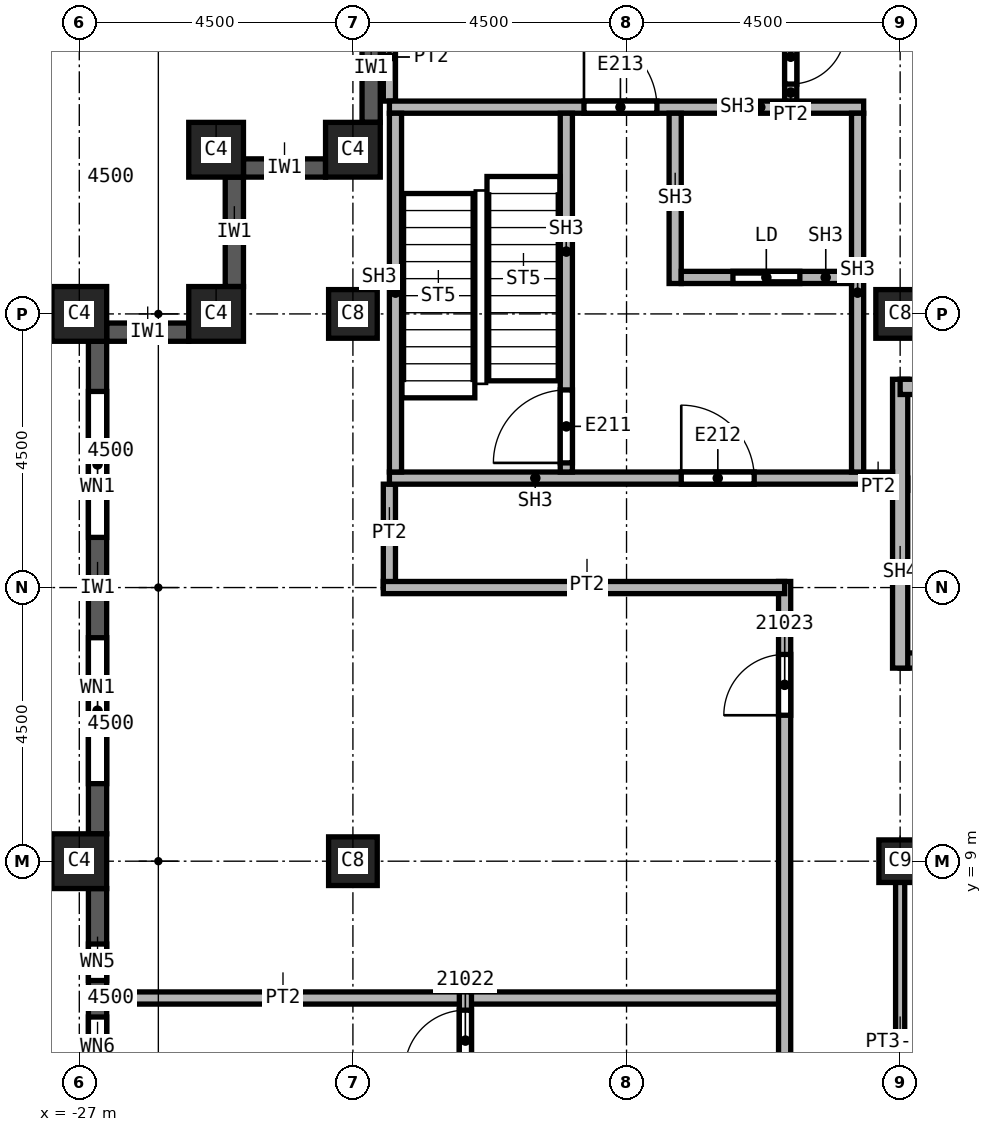
"""IFC4 building model, lengths in metres.
Left out: names, types, materials, properties, quantities, classifications, styles, units other than length and angle.
Written with IfcOpenShell. Run it as: python <this file> out.ifc"""

import sys

from ifc_helpers import new_model, si_unit, direction, frame, frame_2d, origin, origin_2d, place, context, subcontext, project, spatial, rectangle, extrude, element, fill, save


model = new_model("IFC4")
c1 = context("Model", 3, precision=1e-05, world=origin(), true_north=direction((0.0, 1.0)))
c2 = subcontext(c1, "Body", "Model", "MODEL_VIEW")
j1 = project(units=[si_unit("LENGTHUNIT", "METRE"), si_unit("PLANEANGLEUNIT", "RADIAN")], contexts=[c1])
p1 = place(None, origin())
s1 = spatial("IfcSite", under=j1, at=p1, CompositionType="ELEMENT")
p2 = place(p1, origin())
s2 = spatial("IfcBuilding", under=s1, at=p2, CompositionType="ELEMENT")
p3 = place(p2, frame((0.0, 0.0, 304.0)))
s3 = spatial("IfcBuildingStorey", under=s2, at=p3, CompositionType="ELEMENT", Elevation=304.0)
for number, where, z_axis, x_axis in (
    (1, (-13.5, 18.0, 0.0), (0.0, 0.0, 1.0), (1.0, 0.0, 0.0)),
    (2, (-22.5, 9.0, 0.0), (0.0, 0.0, 1.0), (1.0, 0.0, 0.0)),
    (3, (-22.5, 18.0, 0.0), (0.0, 0.0, 1.0), (1.0, 0.0, 0.0)),
):
    element("IfcColumn", number, at=place(p3, frame(where, z_axis=z_axis, x_axis=x_axis)), inside=s3, PredefinedType="COLUMN", context=c2, shape_type="SweptSolid", body=[
        extrude(rectangle(XDim=0.8, YDim=0.8, at=origin_2d()), origin(), (0.0, 0.0, 1.0), 3.74),
    ])
p4 = place(p3, frame((-13.5, 9.0, 0.0), z_axis=(0.0, 0.0, 1.0), x_axis=(1.0, 0.0, 0.0)))
e4 = element("IfcColumn", 4, at=p4, inside=s3, PredefinedType="COLUMN", context=c2, shape_type="SweptSolid", body=[
    extrude(rectangle(XDim=0.7, YDim=0.7, at=origin_2d()), origin(), (0.0, 0.0, 1.0), 3.74),
])
for number, where, z_axis, x_axis in (
    (5, (-27.0, 9.0, 0.0), (0.0, 0.0, 1.0), (0.0, 1.0, 0.0)),
    (6, (-27.0, 18.0, 0.0), (0.0, 0.0, 1.0), (0.0, 1.0, 0.0)),
    (7, (-22.5, 20.7, 0.0), (0.0, 0.0, 1.0), (1.0, 0.0, 0.0)),
    (8, (-24.75, 20.7, 0.0), (0.0, 0.0, 1.0), (1.0, 0.0, 0.0)),
    (9, (-24.75, 18.0, 0.0), (0.0, 0.0, 1.0), (1.0, 0.0, 0.0)),
):
    element("IfcColumn", number, at=place(p3, frame(where, z_axis=z_axis, x_axis=x_axis)), inside=s3, PredefinedType="COLUMN", context=c2, shape_type="SweptSolid", body=[
        extrude(rectangle(XDim=0.9, YDim=0.9, at=origin_2d()), origin(), (0.0, 0.0, 1.0), 3.74),
    ])
p5 = place(p3, frame((-24.45, 20.25, 0.0), z_axis=(0.0, 0.0, 1.0), x_axis=(0.0, -1.0, 0.0)))
e10 = element("IfcWall", 10, at=p5, inside=s3, PredefinedType="SOLIDWALL", context=c2, shape_type="SweptSolid", body=[
    extrude(rectangle(XDim=1.8, YDim=0.3, at=frame_2d((0.9, 0.0))), origin(), (0.0, 0.0, 1.0), 3.14),
])
p6 = place(p3, frame((-25.2, 17.7, 0.0), z_axis=(0.0, 0.0, 1.0), x_axis=(-1.0, 0.0, 0.0)))
e11 = element("IfcWall", 11, at=p6, inside=s3, PredefinedType="SOLIDWALL", context=c2, shape_type="SweptSolid", body=[
    extrude(rectangle(XDim=1.35, YDim=0.3, at=frame_2d((0.675, 0.0))), origin(), (0.0, 0.0, 1.0), 3.14),
])
p7 = place(p3, frame((-26.7, 17.55, 0.0), z_axis=(0.0, 0.0, 1.0), x_axis=(0.0, -1.0, 0.0)))
e12 = element("IfcWall", 12, at=p7, inside=s3, PredefinedType="SOLIDWALL", context=c2, shape_type="SweptSolid", body=[
    extrude(rectangle(XDim=8.1, YDim=0.3, at=frame_2d((4.05, 0.0))), origin(), (0.0, 0.0, 1.0), 3.14),
])
p8 = place(p7, frame((0.825, 0.0, 0.8)))
e13 = element("IfcOpeningElement", 13, at=p8, cuts=e12, PredefinedType="OPENING", context=c2, shape_type="SweptSolid", body=[
    extrude(rectangle(XDim=2.4, YDim=1.95, at=frame_2d((1.2, 0.975))), frame((0.0, 0.15, 0.0), z_axis=(0.0, -1.0, 0.0), x_axis=(1.0, 0.0, 0.0)), (0.0, 0.0, 1.0), 0.3),
])
p9 = place(p7, frame((4.875, 0.0, 0.8)))
e14 = element("IfcOpeningElement", 14, at=p9, cuts=e12, PredefinedType="OPENING", context=c2, shape_type="SweptSolid", body=[
    extrude(rectangle(XDim=2.4, YDim=1.95, at=frame_2d((1.2, 0.975))), frame((0.0, 0.15, 0.0), z_axis=(0.0, -1.0, 0.0), x_axis=(1.0, 0.0, 0.0)), (0.0, 0.0, 1.0), 0.3),
])
p10 = place(p3, frame((-26.7, 8.55, 0.0), z_axis=(0.0, 0.0, 1.0), x_axis=(0.0, -1.0, 0.0)))
e15 = element("IfcWall", 15, at=p10, inside=s3, PredefinedType="SOLIDWALL", context=c2, shape_type="SweptSolid", body=[
    extrude(rectangle(XDim=8.1, YDim=0.3, at=frame_2d((4.05, 0.0))), origin(), (0.0, 0.0, 1.0), 3.14),
])
p11 = place(p10, frame((4.875, 0.0, 0.8)))
e16 = element("IfcOpeningElement", 16, at=p11, cuts=e15, PredefinedType="OPENING", context=c2, shape_type="SweptSolid", body=[
    extrude(rectangle(XDim=2.4, YDim=1.95, at=frame_2d((1.2, 0.975))), frame((0.0, 0.15, 0.0), z_axis=(0.0, -1.0, 0.0), x_axis=(1.0, 0.0, 0.0)), (0.0, 0.0, 1.0), 0.3),
])
p12 = place(p10, frame((0.913, 0.0, 0.8)))
e17 = element("IfcOpeningElement", 17, at=p12, cuts=e15, PredefinedType="OPENING", context=c2, shape_type="SweptSolid", body=[
    extrude(rectangle(XDim=0.6, YDim=1.95, at=frame_2d((0.3, 0.975))), frame((0.0, 0.15, 0.0), z_axis=(0.0, -1.0, 0.0), x_axis=(1.0, 0.0, 0.0)), (0.0, 0.0, 1.0), 0.3),
])
p13 = place(p10, frame((2.113, 0.0, 0.8)))
e18 = element("IfcOpeningElement", 18, at=p13, cuts=e15, PredefinedType="OPENING", context=c2, shape_type="SweptSolid", body=[
    extrude(rectangle(XDim=1.0, YDim=1.95, at=frame_2d((0.5, 0.975))), frame((0.0, 0.15, 0.0), z_axis=(0.0, -1.0, 0.0), x_axis=(1.0, 0.0, 0.0)), (0.0, 0.0, 1.0), 0.3),
])
p14 = place(p3, frame((-22.2, 22.95, 0.0), z_axis=(0.0, 0.0, 1.0), x_axis=(0.0, -1.0, 0.0)))
e19 = element("IfcWall", 19, at=p14, inside=s3, PredefinedType="SOLIDWALL", context=c2, shape_type="SweptSolid", body=[
    extrude(rectangle(XDim=1.8, YDim=0.3, at=frame_2d((0.9, 0.0))), origin(), (0.0, 0.0, 1.0), 3.14),
])
p15 = place(p3, frame((-22.95, 20.4, 0.0), z_axis=(0.0, 0.0, 1.0), x_axis=(-1.0, 0.0, 0.0)))
e20 = element("IfcWall", 20, at=p15, inside=s3, PredefinedType="SOLIDWALL", context=c2, shape_type="SweptSolid", body=[
    extrude(rectangle(XDim=1.35, YDim=0.3, at=frame_2d((0.675, 0.0))), origin(), (0.0, 0.0, 1.0), 3.14),
])
p16 = place(p3, frame((-26.55, 6.75, 0.0), z_axis=(0.0, 0.0, 1.0), x_axis=(1.0, 0.0, 0.0)))
e21 = element("IfcWall", 21, at=p16, inside=s3, PredefinedType="PARTITIONING", context=c2, shape_type="SweptSolid", body=[
    extrude(rectangle(XDim=11.15, YDim=0.2, at=frame_2d((5.575, 0.0))), origin(), (0.0, 0.0, 1.0), 3.74),
])
p17 = place(p3, frame((-21.9, 13.5, 0.0), z_axis=(0.0, 0.0, 1.0), x_axis=(0.0, 1.0, 0.0)))
e22 = element("IfcWall", 22, at=p17, inside=s3, PredefinedType="PARTITIONING", context=c2, shape_type="SweptSolid", body=[
    extrude(rectangle(XDim=1.7, YDim=0.2, at=frame_2d((0.85, 0.0))), origin(), (0.0, 0.0, 1.0), 3.74),
])
p18 = place(p3, frame((-21.9, 21.5, 0.0), z_axis=(0.0, 0.0, 1.0), x_axis=(0.0, 1.0, 0.0)))
e23 = element("IfcWall", 23, at=p18, inside=s3, PredefinedType="PARTITIONING", context=c2, shape_type="SweptSolid", body=[
    extrude(rectangle(XDim=1.45, YDim=0.2, at=frame_2d((0.725, 0.0))), origin(), (0.0, 0.0, 1.0), 3.74),
])
p19 = place(p3, frame((-20.65, -11.25, 0.0), z_axis=(0.0, 0.0, 1.0), x_axis=(0.0, 1.0, 0.0)))
e24 = element("IfcWall", 24, at=p19, inside=s3, PredefinedType="PARTITIONING", context=c2, shape_type="SweptSolid", body=[
    extrude(rectangle(XDim=18.1, YDim=0.2, at=frame_2d((9.05, 0.0))), origin(), (0.0, 0.0, 1.0), 3.74),
])
p20 = place(p19, frame((16.8, 0.0, 0.0)))
e25 = element("IfcOpeningElement", 25, at=p20, cuts=e24, PredefinedType="OPENING", context=c2, shape_type="SweptSolid", body=[
    extrude(rectangle(XDim=1.0, YDim=2.1, at=frame_2d((0.5, 1.05))), frame((0.0, 0.1, 0.0), z_axis=(0.0, -1.0, 0.0), x_axis=(1.0, 0.0, 0.0)), (0.0, 0.0, 1.0), 0.2),
])
p21 = place(p19, frame((3.1, 0.0, 0.0)))
e26 = element("IfcOpeningElement", 26, at=p21, cuts=e24, PredefinedType="OPENING", context=c2, shape_type="SweptSolid", body=[
    extrude(rectangle(XDim=1.0, YDim=2.1, at=frame_2d((0.5, 1.05))), frame((0.0, 0.1, 0.0), z_axis=(0.0, -1.0, 0.0), x_axis=(1.0, 0.0, 0.0)), (0.0, 0.0, 1.0), 0.2),
])
p22 = place(p3, frame((-15.4, -22.95, 0.0), z_axis=(0.0, 0.0, 1.0), x_axis=(0.0, 1.0, 0.0)))
e27 = element("IfcWall", 27, at=p22, inside=s3, PredefinedType="PARTITIONING", context=c2, shape_type="SweptSolid", body=[
    extrude(rectangle(XDim=36.55, YDim=0.2, at=frame_2d((18.275, 0.0))), origin(), (0.0, 0.0, 1.0), 3.74),
])
p23 = place(p22, frame((23.1, 0.0, 0.0)))
e28 = element("IfcOpeningElement", 28, at=p23, cuts=e27, PredefinedType="OPENING", context=c2, shape_type="SweptSolid", body=[
    extrude(rectangle(XDim=1.0, YDim=2.1, at=frame_2d((0.5, 1.05))), frame((0.0, 0.1, 0.0), z_axis=(0.0, -1.0, 0.0), x_axis=(1.0, 0.0, 0.0)), (0.0, 0.0, 1.0), 0.2),
])
p24 = place(p22, frame((34.35, 0.0, 0.0)))
e29 = element("IfcOpeningElement", 29, at=p24, cuts=e27, PredefinedType="OPENING", context=c2, shape_type="SweptSolid", body=[
    extrude(rectangle(XDim=1.0, YDim=2.1, at=frame_2d((0.5, 1.05))), frame((0.0, 0.1, 0.0), z_axis=(0.0, -1.0, 0.0), x_axis=(1.0, 0.0, 0.0)), (0.0, 0.0, 1.0), 0.2),
])
p25 = place(p22, frame((2.95, 0.0, 0.0)))
e30 = element("IfcOpeningElement", 30, at=p25, cuts=e27, PredefinedType="OPENING", context=c2, shape_type="SweptSolid", body=[
    extrude(rectangle(XDim=1.0, YDim=2.1, at=frame_2d((0.5, 1.05))), frame((0.0, 0.1, 0.0), z_axis=(0.0, -1.0, 0.0), x_axis=(1.0, 0.0, 0.0)), (0.0, 0.0, 1.0), 0.2),
])
p26 = place(p22, frame((6.15, 0.0, 0.0)))
e31 = element("IfcOpeningElement", 31, at=p26, cuts=e27, PredefinedType="OPENING", context=c2, shape_type="SweptSolid", body=[
    extrude(rectangle(XDim=1.0, YDim=2.1, at=frame_2d((0.5, 1.05))), frame((0.0, 0.1, 0.0), z_axis=(0.0, -1.0, 0.0), x_axis=(1.0, 0.0, 0.0)), (0.0, 0.0, 1.0), 0.2),
])
p27 = place(p22, frame((8.625, 0.0, 0.0)))
e32 = element("IfcOpeningElement", 32, at=p27, cuts=e27, PredefinedType="OPENING", context=c2, shape_type="SweptSolid", body=[
    extrude(rectangle(XDim=1.0, YDim=2.1, at=frame_2d((0.5, 1.05))), frame((0.0, 0.1, 0.0), z_axis=(0.0, -1.0, 0.0), x_axis=(1.0, 0.0, 0.0)), (0.0, 0.0, 1.0), 0.2),
])
p28 = place(p22, frame((15.0, 0.0, 0.0)))
e33 = element("IfcOpeningElement", 33, at=p28, cuts=e27, PredefinedType="OPENING", context=c2, shape_type="SweptSolid", body=[
    extrude(rectangle(XDim=1.0, YDim=2.1, at=frame_2d((0.5, 1.05))), frame((0.0, 0.1, 0.0), z_axis=(0.0, -1.0, 0.0), x_axis=(1.0, 0.0, 0.0)), (0.0, 0.0, 1.0), 0.2),
])
p29 = place(p3, frame((-15.4, 13.5, 0.0), z_axis=(0.0, 0.0, 1.0), x_axis=(-1.0, 0.0, 0.0)))
e34 = element("IfcWall", 34, at=p29, inside=s3, PredefinedType="PARTITIONING", context=c2, shape_type="SweptSolid", body=[
    extrude(rectangle(XDim=6.6, YDim=0.2, at=frame_2d((3.3, 0.0))), origin(), (0.0, 0.0, 1.0), 3.74),
])
p30 = place(p3, frame((-15.3, 22.95, 0.0), z_axis=(0.0, 0.0, 1.0), x_axis=(0.0, -1.0, 0.0)))
e35 = element("IfcWall", 35, at=p30, inside=s3, PredefinedType="PARTITIONING", context=c2, shape_type="SweptSolid", body=[
    extrude(rectangle(XDim=1.45, YDim=0.2, at=frame_2d((0.725, 0.0))), origin(), (0.0, 0.0, 1.0), 3.74),
])
p31 = place(p30, frame((0.27, 0.0, 0.0)))
e36 = element("IfcOpeningElement", 36, at=p31, cuts=e35, PredefinedType="OPENING", context=c2, shape_type="SweptSolid", body=[
    extrude(rectangle(XDim=0.9, YDim=2.1, at=frame_2d((0.45, 1.05))), frame((0.0, 0.1, 0.0), z_axis=(0.0, -1.0, 0.0), x_axis=(1.0, 0.0, 0.0)), (0.0, 0.0, 1.0), 0.2),
])
p32 = place(p3, frame((-14.1, 15.2, 0.0), z_axis=(0.0, 0.0, 1.0), x_axis=(1.0, 0.0, 0.0)))
e37 = element("IfcWall", 37, at=p32, inside=s3, PredefinedType="PARTITIONING", context=c2, shape_type="SweptSolid", body=[
    extrude(rectangle(XDim=0.725, YDim=0.2, at=frame_2d((0.363, 0.0))), origin(), (0.0, 0.0, 1.0), 3.74),
])
p33 = place(p3, frame((-13.5, 12.3, 0.0), z_axis=(0.0, 0.0, 1.0), x_axis=(1.0, 0.0, 0.0)))
e38 = element("IfcWall", 38, at=p33, inside=s3, PredefinedType="SOLIDWALL", context=c2, shape_type="SweptSolid", body=[
    extrude(rectangle(XDim=9.125, YDim=0.25, at=frame_2d((4.562, 0.0))), origin(), (0.0, 0.0, 1.0), 3.74),
])
p34 = place(p33, frame((0.6, 0.0, 0.0)))
e39 = element("IfcOpeningElement", 39, at=p34, cuts=e38, PredefinedType="OPENING", context=c2, shape_type="SweptSolid", body=[
    extrude(rectangle(XDim=1.2, YDim=2.1, at=frame_2d((0.6, 1.05))), frame((0.0, 0.125, 0.0), z_axis=(0.0, -1.0, 0.0), x_axis=(1.0, 0.0, 0.0)), (0.0, 0.0, 1.0), 0.25),
])
p35 = place(p3, frame((-13.5, 12.175, 0.0), z_axis=(0.0, 0.0, 1.0), x_axis=(0.0, 1.0, 0.0)))
e40 = element("IfcWall", 40, at=p35, inside=s3, PredefinedType="SOLIDWALL", context=c2, shape_type="SweptSolid", body=[
    extrude(rectangle(XDim=4.75, YDim=0.25, at=frame_2d((2.375, 0.0))), origin(), (0.0, 0.0, 1.0), 3.74),
])
p36 = place(p3, frame((-13.5, 16.8, 0.0), z_axis=(0.0, 0.0, 1.0), x_axis=(1.0, 0.0, 0.0)))
e41 = element("IfcWall", 41, at=p36, inside=s3, PredefinedType="SOLIDWALL", context=c2, shape_type="SweptSolid", body=[
    extrude(rectangle(XDim=9.125, YDim=0.25, at=frame_2d((4.562, 0.0))), origin(), (0.0, 0.0, 1.0), 3.74),
])
p37 = place(p3, frame((-13.5, 3.0, 0.0), z_axis=(0.0, 0.0, 1.0), x_axis=(0.0, 1.0, 0.0)))
e42 = element("IfcWall", 42, at=p37, inside=s3, PredefinedType="PARTITIONING", context=c2, shape_type="SweptSolid", body=[
    extrude(rectangle(XDim=6.075, YDim=0.15, at=frame_2d((3.038, 0.0))), origin(), (0.0, 0.0, 1.0), 3.062),
])
p38 = place(p3, frame((-13.5, 9.0, 0.0), z_axis=(0.0, 0.0, 1.0), x_axis=(1.0, 0.0, 0.0)))
e43 = element("IfcWall", 43, at=p38, inside=s3, PredefinedType="PARTITIONING", context=c2, shape_type="SweptSolid", body=[
    extrude(rectangle(XDim=3.0, YDim=0.15, at=frame_2d((1.5, 0.0))), origin(), (0.0, 0.0, 1.0), 3.062),
])
p39 = place(p3, frame((-21.9, 15.3, 0.0), z_axis=(0.0, 0.0, 1.0), x_axis=(1.0, 0.0, 0.0)))
e44 = element("IfcWall", 44, at=p39, inside=s3, PredefinedType="SOLIDWALL", context=c2, shape_type="SweptSolid", body=[
    extrude(rectangle(XDim=8.275, YDim=0.2, at=frame_2d((4.137, 0.0))), origin(), (0.0, 0.0, 1.0), 3.74),
])
p40 = place(p39, frame((4.8, 0.0, 0.0)))
e45 = element("IfcOpeningElement", 45, at=p40, cuts=e44, PredefinedType="OPENING", context=c2, shape_type="SweptSolid", body=[
    extrude(rectangle(XDim=1.2, YDim=2.1, at=frame_2d((0.6, 1.05))), frame((0.0, 0.1, 0.0), z_axis=(0.0, -1.0, 0.0), x_axis=(1.0, 0.0, 0.0)), (0.0, 0.0, 1.0), 0.2),
])
p41 = place(p3, frame((-21.9, 21.4, 0.0), z_axis=(0.0, 0.0, 1.0), x_axis=(1.0, 0.0, 0.0)))
e46 = element("IfcWall", 46, at=p41, inside=s3, PredefinedType="SOLIDWALL", context=c2, shape_type="SweptSolid", body=[
    extrude(rectangle(XDim=7.8, YDim=0.2, at=frame_2d((3.9, 0.0))), origin(), (0.0, 0.0, 1.0), 3.74),
])
p42 = place(p41, frame((3.2, 0.0, 0.0)))
e47 = element("IfcOpeningElement", 47, at=p42, cuts=e46, PredefinedType="OPENING", context=c2, shape_type="SweptSolid", body=[
    extrude(rectangle(XDim=1.2, YDim=2.1, at=frame_2d((0.6, 1.05))), frame((0.0, 0.1, 0.0), z_axis=(0.0, -1.0, 0.0), x_axis=(1.0, 0.0, 0.0)), (0.0, 0.0, 1.0), 0.2),
])
for number, where, z_axis, x_axis in (
    (48, (-21.8, 15.4, 0.0), (0.0, 0.0, 1.0), (0.0, 1.0, 0.0)),
    (49, (-14.2, 15.4, 0.0), (0.0, 0.0, 1.0), (0.0, 1.0, 0.0)),
):
    element("IfcWall", number, at=place(p3, frame(where, z_axis=z_axis, x_axis=x_axis)), inside=s3, PredefinedType="SOLIDWALL", context=c2, shape_type="SweptSolid", body=[
        extrude(rectangle(XDim=5.9, YDim=0.2, at=frame_2d((2.95, 0.0))), origin(), (0.0, 0.0, 1.0), 3.74),
    ])
p43 = place(p3, frame((-18.99, 15.4, 0.0), z_axis=(0.0, 0.0, 1.0), x_axis=(0.0, 1.0, 0.0)))
e50 = element("IfcWall", 50, at=p43, inside=s3, PredefinedType="SOLIDWALL", context=c2, shape_type="SweptSolid", body=[
    extrude(rectangle(XDim=5.9, YDim=0.2, at=frame_2d((2.95, 0.0))), origin(), (0.0, 0.0, 1.0), 3.74),
])
p44 = place(p43, frame((0.15, 0.0, 0.0)))
e51 = element("IfcOpeningElement", 51, at=p44, cuts=e50, PredefinedType="OPENING", context=c2, shape_type="SweptSolid", body=[
    extrude(rectangle(XDim=1.2, YDim=2.1, at=frame_2d((0.6, 1.05))), frame((0.0, 0.1, 0.0), z_axis=(0.0, -1.0, 0.0), x_axis=(1.0, 0.0, 0.0)), (0.0, 0.0, 1.0), 0.2),
])
p45 = place(p3, frame((-17.2, 18.5, 0.0), z_axis=(0.0, 0.0, 1.0), x_axis=(0.0, 1.0, 0.0)))
e52 = element("IfcWall", 52, at=p45, inside=s3, PredefinedType="SOLIDWALL", context=c2, shape_type="SweptSolid", body=[
    extrude(rectangle(XDim=2.8, YDim=0.2, at=frame_2d((1.4, 0.0))), origin(), (0.0, 0.0, 1.0), 3.74),
])
p46 = place(p3, frame((-17.1, 18.6, 0.0), z_axis=(0.0, 0.0, 1.0), x_axis=(1.0, 0.0, 0.0)))
e53 = element("IfcWall", 53, at=p46, inside=s3, PredefinedType="SOLIDWALL", context=c2, shape_type="SweptSolid", body=[
    extrude(rectangle(XDim=2.8, YDim=0.2, at=frame_2d((1.4, 0.0))), origin(), (0.0, 0.0, 1.0), 3.74),
])
p47 = place(p46, frame((0.85, 0.0, 0.0)))
e54 = element("IfcOpeningElement", 54, at=p47, cuts=e53, PredefinedType="OPENING", context=c2, shape_type="SweptSolid", body=[
    extrude(rectangle(XDim=1.1, YDim=2.1, at=frame_2d((0.55, 1.05))), frame((0.0, 0.1, 0.0), z_axis=(0.0, -1.0, 0.0), x_axis=(1.0, 0.0, 0.0)), (0.0, 0.0, 1.0), 0.2),
])
p48 = place(p8, origin())
e55 = element("IfcWindow", 55, at=p48, inside=s3, PartitioningType="SINGLE_PANEL", PredefinedType="WINDOW", context=c2, shape_type="SweptSolid", body=[
    extrude(rectangle(XDim=2.4, YDim=1.95, at=frame_2d((1.2, 0.975))), frame((0.0, 0.03, 0.0), z_axis=(0.0, -1.0, 0.0), x_axis=(1.0, 0.0, 0.0)), (0.0, 0.0, 1.0), 0.06),
])
fill(e13, e55)
p49 = place(p9, origin())
e56 = element("IfcWindow", 56, at=p49, inside=s3, PartitioningType="SINGLE_PANEL", PredefinedType="WINDOW", context=c2, shape_type="SweptSolid", body=[
    extrude(rectangle(XDim=2.4, YDim=1.95, at=frame_2d((1.2, 0.975))), frame((0.0, 0.03, 0.0), z_axis=(0.0, -1.0, 0.0), x_axis=(1.0, 0.0, 0.0)), (0.0, 0.0, 1.0), 0.06),
])
fill(e14, e56)
p50 = place(p20, origin())
e57 = element("IfcDoor", 57, at=p50, inside=s3, OperationType="SINGLE_SWING_LEFT", PredefinedType="DOOR", context=c2, shape_type="SweptSolid", body=[
    extrude(rectangle(XDim=1.0, YDim=2.1, at=frame_2d((0.5, 1.05))), frame((0.0, 0.025, 0.0), z_axis=(0.0, -1.0, 0.0), x_axis=(1.0, 0.0, 0.0)), (0.0, 0.0, 1.0), 0.05),
])
fill(e25, e57)
p51 = place(p24, origin())
e58 = element("IfcDoor", 58, at=p51, inside=s3, OperationType="SINGLE_SWING_RIGHT", PredefinedType="DOOR", context=c2, shape_type="SweptSolid", body=[
    extrude(rectangle(XDim=1.0, YDim=2.1, at=frame_2d((0.5, 1.05))), frame((0.0, 0.025, 0.0), z_axis=(0.0, -1.0, 0.0), x_axis=(1.0, 0.0, 0.0)), (0.0, 0.0, 1.0), 0.05),
])
fill(e29, e58)
p52 = place(p31, origin())
e59 = element("IfcDoor", 59, at=p52, inside=s3, OperationType="SINGLE_SWING_LEFT", PredefinedType="DOOR", context=c2, shape_type="SweptSolid", body=[
    extrude(rectangle(XDim=0.9, YDim=2.1, at=frame_2d((0.45, 1.05))), frame((0.0, 0.025, 0.0), z_axis=(0.0, -1.0, 0.0), x_axis=(1.0, 0.0, 0.0)), (0.0, 0.0, 1.0), 0.05),
])
fill(e36, e59)
p53 = place(p44, origin())
e60 = element("IfcDoor", 60, at=p53, inside=s3, OperationType="SINGLE_SWING_LEFT", PredefinedType="DOOR", context=c2, shape_type="SweptSolid", body=[
    extrude(rectangle(XDim=1.2, YDim=2.1, at=frame_2d((0.6, 1.05))), frame((0.0, 0.025, 0.0), z_axis=(0.0, -1.0, 0.0), x_axis=(1.0, 0.0, 0.0)), (0.0, 0.0, 1.0), 0.05),
])
fill(e51, e60)
p54 = place(p47, origin())
e61 = element("IfcDoor", 61, at=p54, inside=s3, OperationType="SLIDING_TO_LEFT", PredefinedType="DOOR", context=c2, shape_type="SweptSolid", body=[
    extrude(rectangle(XDim=1.1, YDim=2.1, at=frame_2d((0.55, 1.05))), frame((0.0, 0.025, 0.0), z_axis=(0.0, -1.0, 0.0), x_axis=(1.0, 0.0, 0.0)), (0.0, 0.0, 1.0), 0.05),
])
fill(e54, e61)
p55 = place(p40, origin())
e62 = element("IfcDoor", 62, at=p55, inside=s3, OperationType="SINGLE_SWING_RIGHT", PredefinedType="DOOR", context=c2, shape_type="SweptSolid", body=[
    extrude(rectangle(XDim=1.2, YDim=2.1, at=frame_2d((0.6, 1.05))), frame((0.0, 0.025, 0.0), z_axis=(0.0, -1.0, 0.0), x_axis=(1.0, 0.0, 0.0)), (0.0, 0.0, 1.0), 0.05),
])
fill(e45, e62)
p56 = place(p42, origin())
e63 = element("IfcDoor", 63, at=p56, inside=s3, OperationType="SINGLE_SWING_LEFT", PredefinedType="DOOR", context=c2, shape_type="SweptSolid", body=[
    extrude(rectangle(XDim=1.2, YDim=2.1, at=frame_2d((0.6, 1.05))), frame((0.0, 0.025, 0.0), z_axis=(0.0, -1.0, 0.0), x_axis=(1.0, 0.0, 0.0)), (0.0, 0.0, 1.0), 0.05),
])
fill(e47, e63)
p57 = place(p12, origin())
e64 = element("IfcWindow", 64, at=p57, inside=s3, PartitioningType="SINGLE_PANEL", PredefinedType="WINDOW", context=c2, shape_type="SweptSolid", body=[
    extrude(rectangle(XDim=0.6, YDim=1.95, at=frame_2d((0.3, 0.975))), frame((0.0, 0.03, 0.0), z_axis=(0.0, -1.0, 0.0), x_axis=(1.0, 0.0, 0.0)), (0.0, 0.0, 1.0), 0.06),
])
fill(e17, e64)
p58 = place(p13, origin())
e65 = element("IfcWindow", 65, at=p58, inside=s3, PartitioningType="SINGLE_PANEL", PredefinedType="WINDOW", context=c2, shape_type="SweptSolid", body=[
    extrude(rectangle(XDim=1.0, YDim=1.95, at=frame_2d((0.5, 0.975))), frame((0.0, 0.03, 0.0), z_axis=(0.0, -1.0, 0.0), x_axis=(1.0, 0.0, 0.0)), (0.0, 0.0, 1.0), 0.06),
])
fill(e18, e65)
save(model, sys.argv[1])
